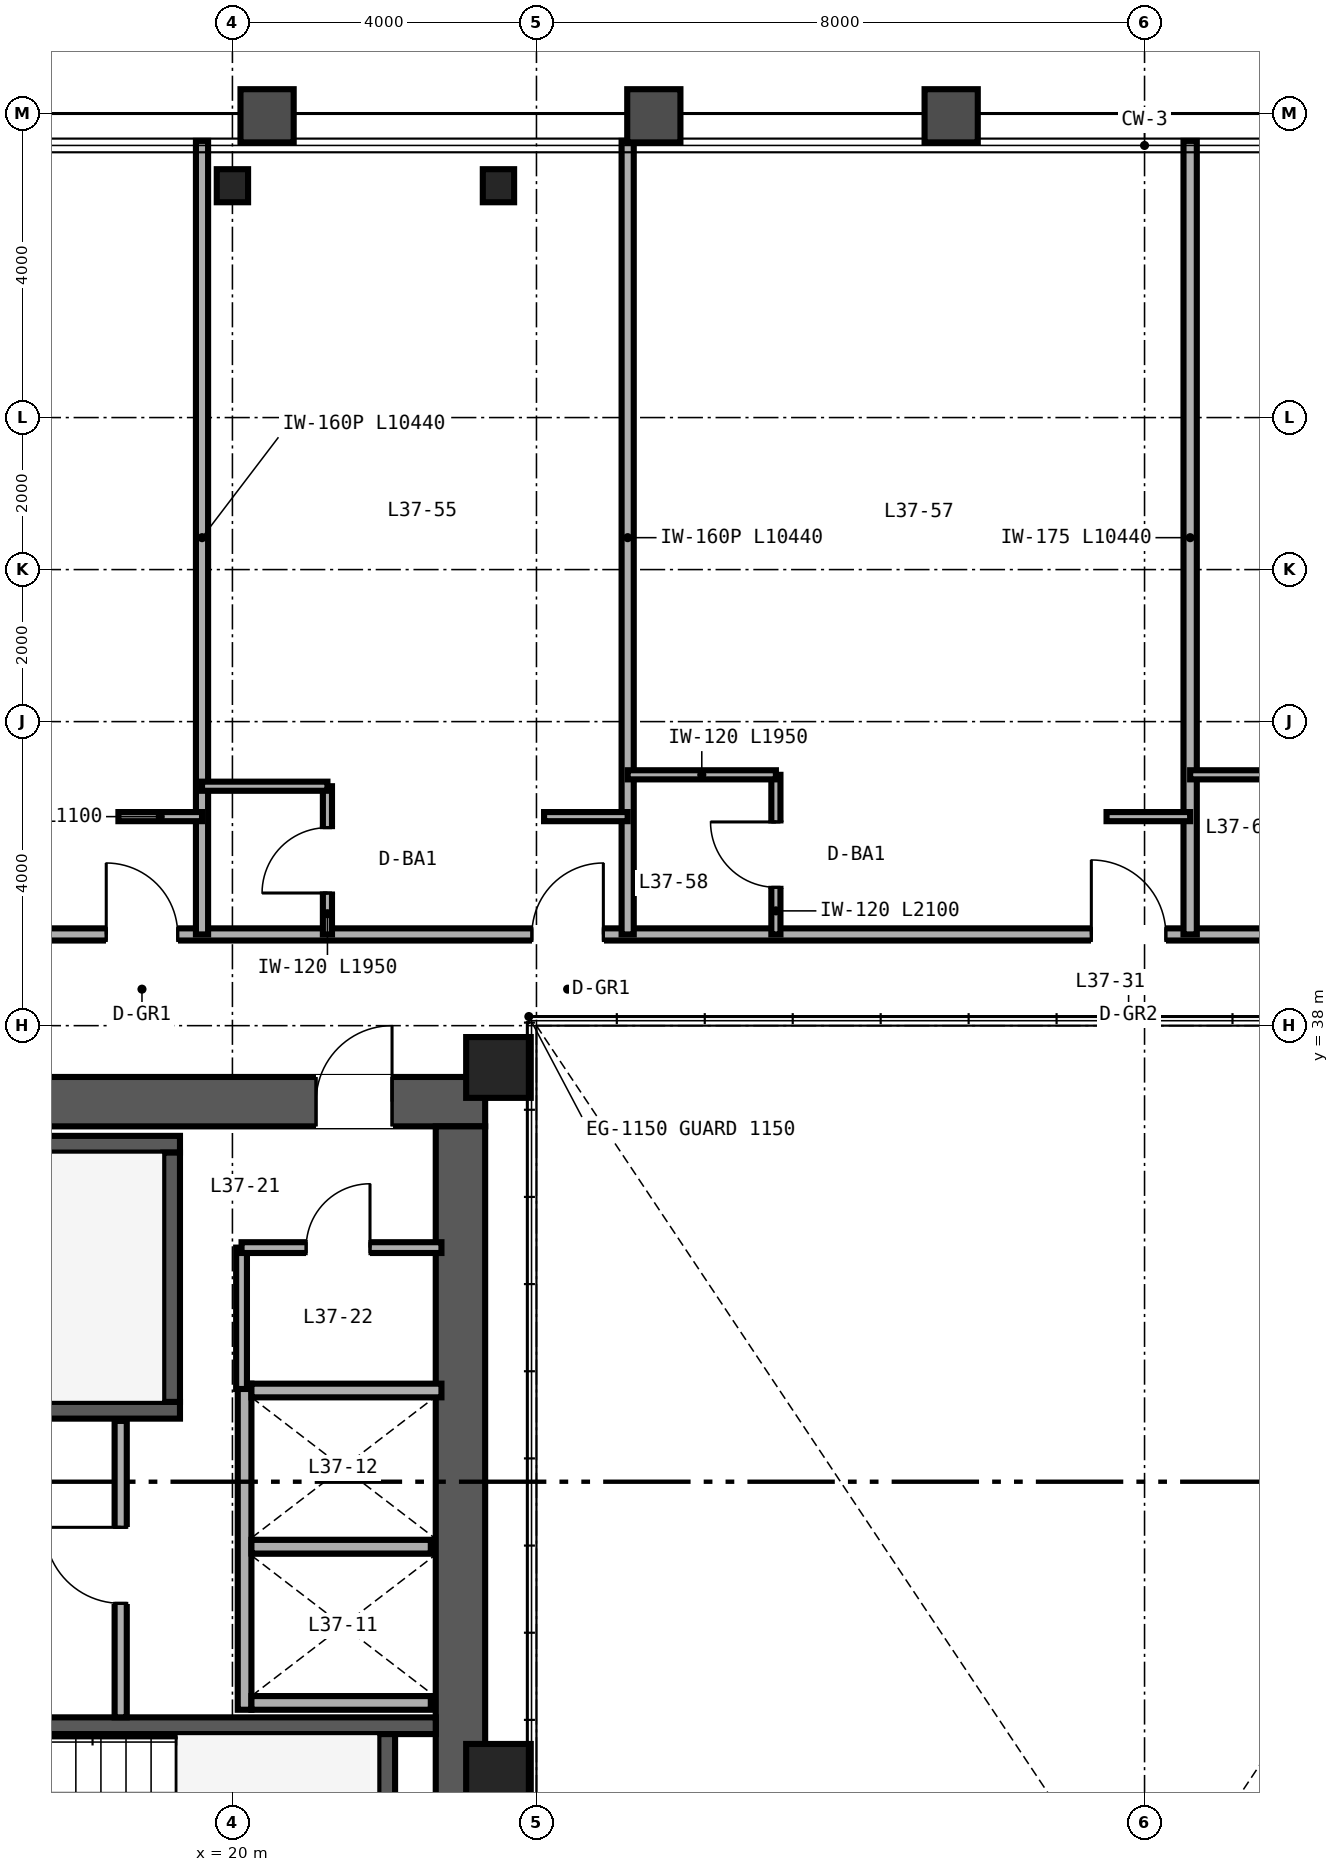
"""IFC4 building model, lengths in metres.
Left out: names, types, materials, properties, quantities, classifications, styles, units other than length and angle.
Written with IfcOpenShell. Run it as: python <this file> out.ifc"""

import sys

from ifc_helpers import new_model, si_unit, direction, frame, frame_2d, origin, origin_2d, place, context, subcontext, project, spatial, rectangle, hollow_rectangle, i_section, extrude, source, transform, mapped, element, fill, save


model = new_model("IFC4")
c1 = context("Model", 3, precision=1e-05, world=origin(), true_north=direction((0.0, 1.0)))
c2 = subcontext(c1, "Body", "Model", "MODEL_VIEW")
j1 = project(units=[si_unit("LENGTHUNIT", "METRE"), si_unit("PLANEANGLEUNIT", "RADIAN")], contexts=[c1])
p1 = place(None, origin())
s1 = spatial("IfcSite", under=j1, at=p1, CompositionType="ELEMENT")
p2 = place(p1, origin())
s2 = spatial("IfcBuilding", under=s1, at=p2, CompositionType="ELEMENT")
p3 = place(p2, frame((0.0, 0.0, 147.6)))
s3 = spatial("IfcBuildingStorey", under=s2, at=p3, CompositionType="ELEMENT", Elevation=147.6)
p4 = place(p3, frame((10.675, 37.0, 0.0), z_axis=(0.0, 0.0, 1.0), x_axis=(1.0, 0.0, 0.0)))
e1 = element("IfcWall", 1, at=p4, inside=s3, PredefinedType="SHEAR", context=c2, shape_type="SweptSolid", body=[
    extrude(rectangle(XDim=12.65, YDim=0.65, at=frame_2d((6.325, 0.0))), origin(), (0.0, 0.0, 1.0), 3.28),
])
p5 = place(p4, frame((10.425, 0.0, 0.0)))
e2 = element("IfcOpeningElement", 2, at=p5, cuts=e1, PredefinedType="OPENING", context=c2, shape_type="SweptSolid", body=[
    extrude(rectangle(XDim=1.0, YDim=2.15, at=frame_2d((0.5, 1.075))), frame((0.0, 0.335, 0.0), z_axis=(0.0, -1.0, 0.0), x_axis=(1.0, 0.0, 0.0)), (0.0, 0.0, 1.0), 0.67),
])
p6 = place(p3, frame((23.0, 15.325, 0.0), z_axis=(0.0, 0.0, 1.0), x_axis=(0.0, 1.0, 0.0)))
e3 = element("IfcWall", 3, at=p6, inside=s3, PredefinedType="SHEAR", context=c2, shape_type="SweptSolid", body=[
    extrude(rectangle(XDim=21.35, YDim=0.65, at=frame_2d((10.675, 0.0))), origin(), (0.0, 0.0, 1.0), 3.28),
])
p7 = place(p3, frame((11.325, 32.94, 0.0), z_axis=(0.0, 0.0, 1.0), x_axis=(1.0, 0.0, 0.0)))
e4 = element("IfcWall", 4, at=p7, inside=s3, PredefinedType="SHEAR", context=c2, shape_type="SweptSolid", body=[
    extrude(rectangle(XDim=7.985, YDim=0.22, at=frame_2d((3.993, 0.0))), origin(), (0.0, 0.0, 1.0), 3.4),
])
p8 = place(p7, frame((0.595, 0.0, 0.0)))
e5 = element("IfcOpeningElement", 5, at=p8, cuts=e4, PredefinedType="OPENING", context=c2, shape_type="SweptSolid", body=[
    extrude(rectangle(XDim=1.05, YDim=2.15, at=frame_2d((0.525, 1.075))), frame((0.0, 0.12, 0.0), z_axis=(0.0, -1.0, 0.0), x_axis=(1.0, 0.0, 0.0)), (0.0, 0.0, 1.0), 0.24),
])
p9 = place(p3, frame((11.325, 36.44, 0.0), z_axis=(0.0, 0.0, 1.0), x_axis=(1.0, 0.0, 0.0)))
e6 = element("IfcWall", 6, at=p9, inside=s3, PredefinedType="SHEAR", context=c2, shape_type="SweptSolid", body=[
    extrude(rectangle(XDim=7.985, YDim=0.22, at=frame_2d((3.993, 0.0))), origin(), (0.0, 0.0, 1.0), 3.4),
])
p10 = place(p3, frame((19.2, 33.05, 0.0), z_axis=(0.0, 0.0, 1.0), x_axis=(0.0, 1.0, 0.0)))
e7 = element("IfcWall", 7, at=p10, inside=s3, PredefinedType="SHEAR", context=c2, shape_type="SweptSolid", body=[
    extrude(rectangle(XDim=3.28, YDim=0.22, at=frame_2d((1.64, 0.0))), origin(), (0.0, 0.0, 1.0), 3.4),
])
p11 = place(p3, frame((14.18, 28.79, 0.0), z_axis=(0.0, 0.0, 1.0), x_axis=(1.0, 0.0, 0.0)))
e8 = element("IfcWall", 8, at=p11, inside=s3, PredefinedType="SHEAR", context=c2, shape_type="SweptSolid", body=[
    extrude(rectangle(XDim=8.495, YDim=0.22, at=frame_2d((4.248, 0.0))), origin(), (0.0, 0.0, 1.0), 3.4),
])
p12 = place(p3, frame((22.03, 25.4, 0.0), z_axis=(0.0, 0.0, 1.0), x_axis=(0.0, 1.0, 0.0)))
e9 = element("IfcWall", 9, at=p12, inside=s3, PredefinedType="SHEAR", context=c2, shape_type="SweptSolid", body=[
    extrude(rectangle(XDim=3.28, YDim=0.22, at=frame_2d((1.64, 0.0))), origin(), (0.0, 0.0, 1.0), 3.4),
])
m1 = source(origin(), c2, "Body", "SweptSolid", [
    extrude(hollow_rectangle(XDim=0.85, YDim=0.8, WallThickness=0.032, at=origin_2d()), origin(), (0.0, 0.0, 1.0), 3.28),
])
for number, where, z_axis, x_axis in (
    (10, (23.5, 28.15, 0.0), (0.0, 0.0, 1.0), (1.0, 0.0, 0.0)),
    (11, (23.5, 37.45, 0.0), (0.0, 0.0, 1.0), (1.0, 0.0, 0.0)),
):
    element("IfcColumn", number, at=place(p3, frame(where, z_axis=z_axis, x_axis=x_axis)), inside=s3, PredefinedType="COLUMN", context=c2, shape_type="MappedRepresentation", body=[
        mapped(m1, transform((0.0, 0.0, 0.0), scale=1.0)),
    ])
m2 = source(origin(), c2, "Body", "SweptSolid", [
    extrude(i_section(OverallWidth=0.412, OverallDepth=0.435, WebThickness=0.036, FlangeThickness=0.057, FilletRadius=0.025, at=origin_2d()), origin(), (0.0, 0.0, 1.0), 3.28),
])
for number, where, z_axis, x_axis in (
    (12, (20.0, 49.05, 0.0), (0.0, 0.0, 1.0), (1.0, 0.0, 0.0)),
    (13, (23.5, 49.05, 0.0), (0.0, 0.0, 1.0), (1.0, 0.0, 0.0)),
):
    element("IfcColumn", number, at=place(p3, frame(where, z_axis=z_axis, x_axis=x_axis)), inside=s3, PredefinedType="COLUMN", context=c2, shape_type="MappedRepresentation", body=[
        mapped(m2, transform((0.0, 0.0, 0.0), scale=1.0)),
    ])
p13 = place(p3, frame((20.16, 29.0, 0.0), z_axis=(0.0, 0.0, 1.0), x_axis=(0.0, 1.0, 0.0)))
e14 = element("IfcWall", 14, at=p13, inside=s3, PredefinedType="SOLIDWALL", context=c2, shape_type="SweptSolid", body=[
    extrude(rectangle(XDim=4.29, YDim=0.18, at=frame_2d((2.145, 0.0))), origin(), (0.0, 0.0, 1.0), 3.28),
])
p14 = place(p3, frame((20.25, 29.09, 0.0), z_axis=(0.0, 0.0, 1.0), x_axis=(1.0, 0.0, 0.0)))
e15 = element("IfcWall", 15, at=p14, inside=s3, PredefinedType="SOLIDWALL", context=c2, shape_type="SweptSolid", body=[
    extrude(rectangle(XDim=2.36, YDim=0.18, at=frame_2d((1.18, 0.0))), origin(), (0.0, 0.0, 1.0), 3.28),
])
p15 = place(p3, frame((20.25, 33.2, 0.0), z_axis=(0.0, 0.0, 1.0), x_axis=(1.0, 0.0, 0.0)))
e16 = element("IfcWall", 16, at=p15, inside=s3, PredefinedType="SOLIDWALL", context=c2, shape_type="SweptSolid", body=[
    extrude(rectangle(XDim=2.5, YDim=0.18, at=frame_2d((1.25, 0.0))), origin(), (0.0, 0.0, 1.0), 3.28),
])
p16 = place(p3, frame((20.25, 31.145, 0.0), z_axis=(0.0, 0.0, 1.0), x_axis=(1.0, 0.0, 0.0)))
e17 = element("IfcWall", 17, at=p16, inside=s3, PredefinedType="SOLIDWALL", context=c2, shape_type="SweptSolid", body=[
    extrude(rectangle(XDim=2.36, YDim=0.18, at=frame_2d((1.18, 0.0))), origin(), (0.0, 0.0, 1.0), 3.28),
])
p17 = place(p3, frame((18.53, 28.9, 0.0), z_axis=(0.0, 0.0, 1.0), x_axis=(0.0, 1.0, 0.0)))
e18 = element("IfcWall", 18, at=p17, inside=s3, PredefinedType="PARTITIONING", context=c2, shape_type="SweptSolid", body=[
    extrude(rectangle(XDim=3.9, YDim=0.16, at=frame_2d((1.95, 0.0))), origin(), (0.0, 0.0, 1.0), 3.28),
])
p18 = place(p17, frame((1.5, 0.0, 0.0)))
e19 = element("IfcOpeningElement", 19, at=p18, cuts=e18, PredefinedType="OPENING", context=c2, shape_type="SweptSolid", body=[
    extrude(rectangle(XDim=1.0, YDim=2.15, at=frame_2d((0.5, 1.075))), frame((0.0, 0.09, 0.0), z_axis=(0.0, -1.0, 0.0), x_axis=(1.0, 0.0, 0.0)), (0.0, 0.0, 1.0), 0.18),
])
p19 = place(p3, frame((20.12, 33.22, 0.0), z_axis=(0.0, 0.0, 1.0), x_axis=(0.0, 1.0, 0.0)))
e20 = element("IfcWall", 20, at=p19, inside=s3, PredefinedType="PARTITIONING", context=c2, shape_type="SweptSolid", body=[
    extrude(rectangle(XDim=1.86, YDim=0.142, at=frame_2d((0.93, 0.0))), origin(), (0.0, 0.0, 1.0), 3.28),
])
p20 = place(p3, frame((20.12, 35.08, 0.0), z_axis=(0.0, 0.0, 1.0), x_axis=(1.0, 0.0, 0.0)))
e21 = element("IfcWall", 21, at=p20, inside=s3, PredefinedType="PARTITIONING", context=c2, shape_type="SweptSolid", body=[
    extrude(rectangle(XDim=2.63, YDim=0.142, at=frame_2d((1.315, 0.0))), origin(), (0.0, 0.0, 1.0), 3.28),
])
p21 = place(p20, frame((0.85, 0.0, 0.0)))
e22 = element("IfcOpeningElement", 22, at=p21, cuts=e21, PredefinedType="OPENING", context=c2, shape_type="SweptSolid", body=[
    extrude(rectangle(XDim=0.84, YDim=2.1, at=frame_2d((0.42, 1.05))), frame((0.0, 0.081, 0.0), z_axis=(0.0, -1.0, 0.0), x_axis=(1.0, 0.0, 0.0)), (0.0, 0.0, 1.0), 0.162),
])
p22 = place(p3, frame((14.0, 39.2, 0.0), z_axis=(0.0, 0.0, 1.0), x_axis=(1.0, 0.0, 0.0)))
e23 = element("IfcWall", 23, at=p22, inside=s3, PredefinedType="PARTITIONING", context=c2, shape_type="SweptSolid", body=[
    extrude(rectangle(XDim=36.0, YDim=0.16, at=frame_2d((18.0, 0.0))), origin(), (0.0, 0.0, 1.0), 2.501),
])
p23 = place(p22, frame((4.34, 0.0, 0.0)))
e24 = element("IfcOpeningElement", 24, at=p23, cuts=e23, PredefinedType="OPENING", context=c2, shape_type="SweptSolid", body=[
    extrude(rectangle(XDim=0.94, YDim=2.15, at=frame_2d((0.47, 1.075))), frame((0.0, 0.09, 0.0), z_axis=(0.0, -1.0, 0.0), x_axis=(1.0, 0.0, 0.0)), (0.0, 0.0, 1.0), 0.18),
])
p24 = place(p22, frame((9.94, 0.0, 0.0)))
e25 = element("IfcOpeningElement", 25, at=p24, cuts=e23, PredefinedType="OPENING", context=c2, shape_type="SweptSolid", body=[
    extrude(rectangle(XDim=0.94, YDim=2.15, at=frame_2d((0.47, 1.075))), frame((0.0, 0.09, 0.0), z_axis=(0.0, -1.0, 0.0), x_axis=(1.0, 0.0, 0.0)), (0.0, 0.0, 1.0), 0.18),
])
p25 = place(p22, frame((17.3, 0.0, 0.0)))
e26 = element("IfcOpeningElement", 26, at=p25, cuts=e23, PredefinedType="OPENING", context=c2, shape_type="SweptSolid", body=[
    extrude(rectangle(XDim=0.98, YDim=2.2, at=frame_2d((0.49, 1.1))), frame((0.0, 0.09, 0.0), z_axis=(0.0, -1.0, 0.0), x_axis=(1.0, 0.0, 0.0)), (0.0, 0.0, 1.0), 0.18),
])
p26 = place(p22, frame((24.7, 0.0, 0.0)))
e27 = element("IfcOpeningElement", 27, at=p26, cuts=e23, PredefinedType="OPENING", context=c2, shape_type="SweptSolid", body=[
    extrude(rectangle(XDim=0.98, YDim=2.2, at=frame_2d((0.49, 1.1))), frame((0.0, 0.09, 0.0), z_axis=(0.0, -1.0, 0.0), x_axis=(1.0, 0.0, 0.0)), (0.0, 0.0, 1.0), 0.18),
])
p27 = place(p22, frame((28.12, 0.0, 0.0)))
e28 = element("IfcOpeningElement", 28, at=p27, cuts=e23, PredefinedType="OPENING", context=c2, shape_type="SweptSolid", body=[
    extrude(rectangle(XDim=0.96, YDim=2.15, at=frame_2d((0.48, 1.075))), frame((0.0, 0.09, 0.0), z_axis=(0.0, -1.0, 0.0), x_axis=(1.0, 0.0, 0.0)), (0.0, 0.0, 1.0), 0.18),
])
p28 = place(p22, frame((34.74, 0.0, 0.0)))
e29 = element("IfcOpeningElement", 29, at=p28, cuts=e23, PredefinedType="OPENING", context=c2, shape_type="SweptSolid", body=[
    extrude(rectangle(XDim=0.94, YDim=2.15, at=frame_2d((0.47, 1.075))), frame((0.0, 0.09, 0.0), z_axis=(0.0, -1.0, 0.0), x_axis=(1.0, 0.0, 0.0)), (0.0, 0.0, 1.0), 0.18),
])
p29 = place(p3, frame((19.6, 39.2, 0.0), z_axis=(0.0, 0.0, 1.0), x_axis=(0.0, 1.0, 0.0)))
e30 = element("IfcWall", 30, at=p29, inside=s3, PredefinedType="PARTITIONING", context=c2, shape_type="SweptSolid", body=[
    extrude(rectangle(XDim=10.44, YDim=0.16, at=frame_2d((5.22, 0.0))), origin(), (0.0, 0.0, 1.0), 2.587),
])
p30 = place(p3, frame((18.5, 40.75, 0.0), z_axis=(0.0, 0.0, 1.0), x_axis=(1.0, 0.0, 0.0)))
e31 = element("IfcWall", 31, at=p30, inside=s3, PredefinedType="PARTITIONING", context=c2, shape_type="SweptSolid", body=[
    extrude(rectangle(XDim=1.1, YDim=0.12, at=frame_2d((0.55, 0.0))), origin(), (0.0, 0.0, 1.0), 3.28),
])
p31 = place(p3, frame((25.2, 39.2, 0.0), z_axis=(0.0, 0.0, 1.0), x_axis=(0.0, 1.0, 0.0)))
e32 = element("IfcWall", 32, at=p31, inside=s3, PredefinedType="PARTITIONING", context=c2, shape_type="SweptSolid", body=[
    extrude(rectangle(XDim=10.44, YDim=0.16, at=frame_2d((5.22, 0.0))), origin(), (0.0, 0.0, 1.0), 2.36),
])
p32 = place(p3, frame((21.25, 39.2, 0.0), z_axis=(0.0, 0.0, 1.0), x_axis=(0.0, 1.0, 0.0)))
e33 = element("IfcWall", 33, at=p32, inside=s3, PredefinedType="PARTITIONING", context=c2, shape_type="SweptSolid", body=[
    extrude(rectangle(XDim=1.95, YDim=0.12, at=frame_2d((0.975, 0.0))), origin(), (0.0, 0.0, 1.0), 3.28),
])
p33 = place(p32, frame((0.545, 0.0, 0.0)))
e34 = element("IfcOpeningElement", 34, at=p33, cuts=e33, PredefinedType="OPENING", context=c2, shape_type="SweptSolid", body=[
    extrude(rectangle(XDim=0.86, YDim=2.1, at=frame_2d((0.43, 1.05))), frame((0.0, 0.07, 0.0), z_axis=(0.0, -1.0, 0.0), x_axis=(1.0, 0.0, 0.0)), (0.0, 0.0, 1.0), 0.14),
])
p34 = place(p3, frame((19.6, 41.15, 0.0), z_axis=(0.0, 0.0, 1.0), x_axis=(1.0, 0.0, 0.0)))
e35 = element("IfcWall", 35, at=p34, inside=s3, PredefinedType="PARTITIONING", context=c2, shape_type="SweptSolid", body=[
    extrude(rectangle(XDim=1.65, YDim=0.12, at=frame_2d((0.825, 0.0))), origin(), (0.0, 0.0, 1.0), 3.28),
])
p35 = place(p3, frame((24.1, 40.75, 0.0), z_axis=(0.0, 0.0, 1.0), x_axis=(1.0, 0.0, 0.0)))
e36 = element("IfcWall", 36, at=p35, inside=s3, PredefinedType="PARTITIONING", context=c2, shape_type="SweptSolid", body=[
    extrude(rectangle(XDim=1.1, YDim=0.12, at=frame_2d((0.55, 0.0))), origin(), (0.0, 0.0, 1.0), 3.28),
])
p36 = place(p3, frame((32.6, 39.2, 0.0), z_axis=(0.0, 0.0, 1.0), x_axis=(0.0, 1.0, 0.0)))
e37 = element("IfcWall", 37, at=p36, inside=s3, PredefinedType="PARTITIONING", context=c2, shape_type="SweptSolid", body=[
    extrude(rectangle(XDim=10.44, YDim=0.175, at=frame_2d((5.22, 0.0))), origin(), (0.0, 0.0, 1.0), 2.36),
])
p37 = place(p3, frame((27.15, 39.2, 0.0), z_axis=(0.0, 0.0, 1.0), x_axis=(0.0, 1.0, 0.0)))
e38 = element("IfcWall", 38, at=p37, inside=s3, PredefinedType="PARTITIONING", context=c2, shape_type="SweptSolid", body=[
    extrude(rectangle(XDim=2.1, YDim=0.12, at=frame_2d((1.05, 0.0))), origin(), (0.0, 0.0, 1.0), 3.28),
])
p38 = place(p37, frame((0.62, 0.0, 0.0)))
e39 = element("IfcOpeningElement", 39, at=p38, cuts=e38, PredefinedType="OPENING", context=c2, shape_type="SweptSolid", body=[
    extrude(rectangle(XDim=0.86, YDim=2.1, at=frame_2d((0.43, 1.05))), frame((0.0, 0.07, 0.0), z_axis=(0.0, -1.0, 0.0), x_axis=(1.0, 0.0, 0.0)), (0.0, 0.0, 1.0), 0.14),
])
p39 = place(p3, frame((25.2, 41.3, 0.0), z_axis=(0.0, 0.0, 1.0), x_axis=(1.0, 0.0, 0.0)))
e40 = element("IfcWall", 40, at=p39, inside=s3, PredefinedType="PARTITIONING", context=c2, shape_type="SweptSolid", body=[
    extrude(rectangle(XDim=1.95, YDim=0.12, at=frame_2d((0.975, 0.0))), origin(), (0.0, 0.0, 1.0), 3.28),
])
p40 = place(p3, frame((31.5, 40.75, 0.0), z_axis=(0.0, 0.0, 1.0), x_axis=(1.0, 0.0, 0.0)))
e41 = element("IfcWall", 41, at=p40, inside=s3, PredefinedType="PARTITIONING", context=c2, shape_type="SweptSolid", body=[
    extrude(rectangle(XDim=1.1, YDim=0.12, at=frame_2d((0.55, 0.0))), origin(), (0.0, 0.0, 1.0), 3.28),
])
p41 = place(p3, frame((32.6, 41.3, 0.0), z_axis=(0.0, 0.0, 1.0), x_axis=(1.0, 0.0, 0.0)))
e42 = element("IfcWall", 42, at=p41, inside=s3, PredefinedType="PARTITIONING", context=c2, shape_type="SweptSolid", body=[
    extrude(rectangle(XDim=1.95, YDim=0.12, at=frame_2d((0.975, 0.0))), origin(), (0.0, 0.0, 1.0), 3.28),
])
m3 = source(origin(), c2, "Body", "SweptSolid", [
    extrude(rectangle(XDim=1.0, YDim=2.15, at=frame_2d((0.5, 1.075))), frame((0.0, 0.025, 0.0), z_axis=(0.0, -1.0, 0.0), x_axis=(1.0, 0.0, 0.0)), (0.0, 0.0, 1.0), 0.05),
])
p42 = place(p18, origin())
e43 = element("IfcDoor", 43, at=p42, inside=s3, OperationType="SINGLE_SWING_RIGHT", PredefinedType="DOOR", context=c2, shape_type="MappedRepresentation", body=[
    mapped(m3, transform((0.0, 0.0, 0.0), scale=1.0)),
])
fill(e19, e43)
m4 = source(origin(), c2, "Body", "SweptSolid", [
    extrude(rectangle(XDim=0.84, YDim=2.1, at=frame_2d((0.42, 1.05))), frame((0.0, 0.025, 0.0), z_axis=(0.0, -1.0, 0.0), x_axis=(1.0, 0.0, 0.0)), (0.0, 0.0, 1.0), 0.05),
])
p43 = place(p21, origin())
e44 = element("IfcDoor", 44, at=p43, inside=s3, OperationType="SINGLE_SWING_RIGHT", PredefinedType="DOOR", context=c2, shape_type="MappedRepresentation", body=[
    mapped(m4, transform((0.0, 0.0, 0.0), scale=1.0)),
])
fill(e22, e44)
p44 = place(p5, origin())
e45 = element("IfcDoor", 45, at=p44, inside=s3, OperationType="SINGLE_SWING_RIGHT", PredefinedType="DOOR", context=c2, shape_type="MappedRepresentation", body=[
    mapped(m3, transform((0.0, 0.0, 0.0), scale=1.0)),
])
fill(e2, e45)
m5 = source(origin(), c2, "Body", "SweptSolid", [
    extrude(rectangle(XDim=0.86, YDim=2.1, at=frame_2d((0.43, 1.05))), frame((0.0, 0.025, 0.0), z_axis=(0.0, -1.0, 0.0), x_axis=(1.0, 0.0, 0.0)), (0.0, 0.0, 1.0), 0.05),
])
p45 = place(p33, origin())
e46 = element("IfcDoor", 46, at=p45, inside=s3, OperationType="SINGLE_SWING_LEFT", PredefinedType="DOOR", context=c2, shape_type="MappedRepresentation", body=[
    mapped(m5, transform((0.0, 0.0, 0.0), scale=1.0)),
])
fill(e34, e46)
p46 = place(p38, origin())
e47 = element("IfcDoor", 47, at=p46, inside=s3, OperationType="SINGLE_SWING_RIGHT", PredefinedType="DOOR", context=c2, shape_type="MappedRepresentation", body=[
    mapped(m5, transform((0.0, 0.0, 0.0), scale=1.0)),
])
fill(e39, e47)
m6 = source(origin(), c2, "Body", "SweptSolid", [
    extrude(rectangle(XDim=0.94, YDim=2.15, at=frame_2d((0.47, 1.075))), frame((0.0, 0.025, 0.0), z_axis=(0.0, -1.0, 0.0), x_axis=(1.0, 0.0, 0.0)), (0.0, 0.0, 1.0), 0.05),
])
p47 = place(p23, origin())
e48 = element("IfcDoor", 48, at=p47, inside=s3, OperationType="SINGLE_SWING_LEFT", PredefinedType="DOOR", context=c2, shape_type="MappedRepresentation", body=[
    mapped(m6, transform((0.0, 0.0, 0.0), scale=1.0)),
])
fill(e24, e48)
p48 = place(p24, origin())
e49 = element("IfcDoor", 49, at=p48, inside=s3, OperationType="SINGLE_SWING_RIGHT", PredefinedType="DOOR", context=c2, shape_type="MappedRepresentation", body=[
    mapped(m6, transform((0.0, 0.0, 0.0), scale=1.0)),
])
fill(e25, e49)
m7 = source(origin(), c2, "Body", "SweptSolid", [
    extrude(rectangle(XDim=0.98, YDim=2.2, at=frame_2d((0.49, 1.1))), frame((0.0, 0.025, 0.0), z_axis=(0.0, -1.0, 0.0), x_axis=(1.0, 0.0, 0.0)), (0.0, 0.0, 1.0), 0.05),
])
p49 = place(p25, origin())
e50 = element("IfcDoor", 50, at=p49, inside=s3, OperationType="SINGLE_SWING_LEFT", PredefinedType="DOOR", context=c2, shape_type="MappedRepresentation", body=[
    mapped(m7, transform((0.0, 0.0, 0.0), scale=1.0)),
])
fill(e26, e50)
save(model, sys.argv[1])
